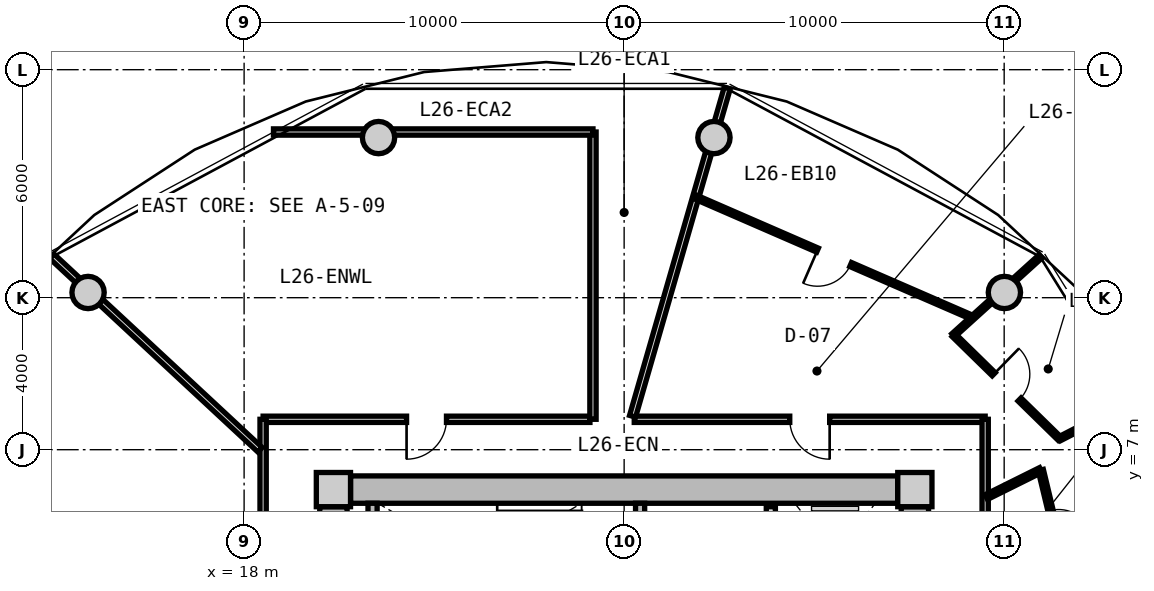
"""IFC4 building model, lengths in metres.
Left out: names, types, materials, properties, quantities, classifications, styles, units other than length and angle.
Written with IfcOpenShell. Run it as: python <this file> out.ifc"""

import sys

from ifc_helpers import new_model, si_unit, direction, frame, frame_2d, origin, origin_2d, place, context, subcontext, project, spatial, rectangle, circle, extrude, source, transform, mapped, element, fill, save


model = new_model("IFC4")
c1 = context("Model", 3, precision=1e-05, world=origin(), true_north=direction((0.0, 1.0)))
c2 = subcontext(c1, "Body", "Model", "MODEL_VIEW")
j1 = project(units=[si_unit("LENGTHUNIT", "METRE"), si_unit("PLANEANGLEUNIT", "RADIAN")], contexts=[c1])
p1 = place(None, origin())
s1 = spatial("IfcSite", under=j1, at=p1, CompositionType="ELEMENT")
p2 = place(p1, origin())
s2 = spatial("IfcBuilding", under=s1, at=p2, CompositionType="ELEMENT")
p3 = place(p2, frame((0.0, 0.0, 87.1)))
s3 = spatial("IfcBuildingStorey", under=s2, at=p3, CompositionType="ELEMENT", Elevation=87.1)
m1 = source(origin(), c2, "Body", "SweptSolid", [
    extrude(rectangle(XDim=0.9, YDim=0.9, at=origin_2d()), origin(), (0.0, 0.0, 1.0), 3.05),
])
for number, where, z_axis, x_axis in (
    (1, (35.65, 5.95, 0.0), (0.0, 0.0, 1.0), (1.0, 0.0, 0.0)),
    (2, (20.35, 5.95, 0.0), (0.0, 0.0, 1.0), (1.0, 0.0, 0.0)),
):
    element("IfcColumn", number, at=place(p3, frame(where, z_axis=z_axis, x_axis=x_axis)), inside=s3, PredefinedType="COLUMN", context=c2, shape_type="MappedRepresentation", body=[
        mapped(m1, transform((0.0, 0.0, 0.0), x_axis=(1.0, 0.0, 0.0), y_axis=(0.0, 1.0, 0.0), z_axis=(0.0, 0.0, 1.0), scale=1.0)),
    ])
m2 = source(origin(), c2, "Body", "SweptSolid", [
    extrude(rectangle(XDim=14.4, YDim=0.72, at=frame_2d((7.2, 0.0))), origin(), (0.0, 0.0, 1.0), 2.79),
])
p4 = place(p3, frame((20.8, 5.95, 0.0), z_axis=(0.0, 0.0, 1.0), x_axis=(1.0, 0.0, 0.0)))
e3 = element("IfcWall", 3, at=p4, inside=s3, PredefinedType="SHEAR", context=c2, shape_type="MappedRepresentation", body=[
    mapped(m2, transform((0.0, 0.0, 0.0), x_axis=(1.0, 0.0, 0.0), y_axis=(0.0, 1.0, 0.0), z_axis=(0.0, 0.0, 1.0), scale=1.0)),
])
m3 = source(origin(), c2, "Body", "SweptSolid", [
    extrude(rectangle(XDim=11.0, YDim=0.72, at=frame_2d((5.5, 0.0))), origin(), (0.0, 0.0, 1.0), 2.79),
])
p5 = place(p3, frame((20.35, -5.5, 0.0), z_axis=(0.0, 0.0, 1.0), x_axis=(0.0, 1.0, 0.0)))
e4 = element("IfcWall", 4, at=p5, inside=s3, PredefinedType="SHEAR", context=c2, shape_type="MappedRepresentation", body=[
    mapped(m3, transform((0.0, 0.0, 0.0), x_axis=(1.0, 0.0, 0.0), y_axis=(0.0, 1.0, 0.0), z_axis=(0.0, 0.0, 1.0), scale=1.0)),
])
p6 = place(p5, frame((3.8, 0.0, 0.0)))
e5 = element("IfcOpeningElement", 5, at=p6, cuts=e4, PredefinedType="OPENING", context=c2, shape_type="SweptSolid", body=[
    extrude(rectangle(XDim=1.2, YDim=2.15, at=frame_2d((0.6, 1.075))), frame((0.0, 0.37, 0.0), z_axis=(0.0, -1.0, 0.0), x_axis=(1.0, 0.0, 0.0)), (0.0, 0.0, 1.0), 0.74),
])
p7 = place(p3, frame((35.65, 5.5, 0.0), z_axis=(0.0, 0.0, 1.0), x_axis=(0.0, -1.0, 0.0)))
e6 = element("IfcWall", 6, at=p7, inside=s3, PredefinedType="SHEAR", context=c2, shape_type="MappedRepresentation", body=[
    mapped(m3, transform((0.0, 0.0, 0.0), x_axis=(1.0, 0.0, 0.0), y_axis=(0.0, 1.0, 0.0), z_axis=(0.0, 0.0, 1.0), scale=1.0)),
])
p8 = place(p7, frame((5.65, 0.0, 0.0)))
e7 = element("IfcOpeningElement", 7, at=p8, cuts=e6, PredefinedType="OPENING", context=c2, shape_type="SweptSolid", body=[
    extrude(rectangle(XDim=1.2, YDim=2.15, at=frame_2d((0.6, 1.075))), frame((0.0, 0.37, 0.0), z_axis=(0.0, -1.0, 0.0), x_axis=(1.0, 0.0, 0.0)), (0.0, 0.0, 1.0), 0.74),
])
m4 = source(origin(), c2, "Body", "SweptSolid", [
    extrude(circle(Radius=0.425, at=origin_2d()), origin(), (0.0, 0.0, 1.0), 3.05),
])
for number, where, z_axis, x_axis in (
    (8, (38.006, 11.137, 0.0), (0.0, 0.0, 1.0), (1.0, 0.0, 0.0)),
    (9, (30.363, 15.213, 0.0), (0.0, 0.0, 1.0), (1.0, 0.0, 0.0)),
    (10, (21.537, 15.213, 0.0), (0.0, 0.0, 1.0), (1.0, 0.0, 0.0)),
    (11, (13.894, 11.137, 0.0), (0.0, 0.0, 1.0), (1.0, 0.0, 0.0)),
):
    element("IfcColumn", number, at=place(p3, frame(where, z_axis=z_axis, x_axis=x_axis)), inside=s3, PredefinedType="COLUMN", context=c2, shape_type="MappedRepresentation", body=[
        mapped(m4, transform((0.0, 0.0, 0.0), x_axis=(1.0, 0.0, 0.0), y_axis=(0.0, 1.0, 0.0), z_axis=(0.0, 0.0, 1.0), scale=1.0)),
    ])
m5 = source(origin(), c2, "Body", "SweptSolid", [
    extrude(rectangle(XDim=3.14, YDim=0.24, at=frame_2d((1.57, 0.0))), origin(), (0.0, 0.0, 1.0), 2.79),
])
p9 = place(p3, frame((21.38, 2.45, 0.0), z_axis=(0.0, 0.0, 1.0), x_axis=(0.0, 1.0, 0.0)))
e12 = element("IfcWall", 12, at=p9, inside=s3, PredefinedType="PARTITIONING", context=c2, shape_type="MappedRepresentation", body=[
    mapped(m5, transform((0.0, 0.0, 0.0), x_axis=(1.0, 0.0, 0.0), y_axis=(0.0, 1.0, 0.0), z_axis=(0.0, 0.0, 1.0), scale=1.0)),
])
p10 = place(p3, frame((28.42, 2.45, 0.0), z_axis=(0.0, 0.0, 1.0), x_axis=(0.0, 1.0, 0.0)))
e13 = element("IfcWall", 13, at=p10, inside=s3, PredefinedType="PARTITIONING", context=c2, shape_type="MappedRepresentation", body=[
    mapped(m5, transform((0.0, 0.0, 0.0), x_axis=(1.0, 0.0, 0.0), y_axis=(0.0, 1.0, 0.0), z_axis=(0.0, 0.0, 1.0), scale=1.0)),
])
p11 = place(p10, frame((0.55, 0.0, 0.0)))
e14 = element("IfcOpeningElement", 14, at=p11, cuts=e13, PredefinedType="OPENING", context=c2, shape_type="SweptSolid", body=[
    extrude(rectangle(XDim=1.1, YDim=2.15, at=frame_2d((0.55, 1.075))), frame((0.0, 0.13, 0.0), z_axis=(0.0, -1.0, 0.0), x_axis=(1.0, 0.0, 0.0)), (0.0, 0.0, 1.0), 0.26),
])
m6 = source(origin(), c2, "Body", "SweptSolid", [
    extrude(rectangle(XDim=5.0, YDim=0.24, at=frame_2d((2.5, 0.0))), origin(), (0.0, 0.0, 1.0), 2.775),
])
p12 = place(p3, frame((31.86, 0.5, 0.0), z_axis=(0.0, 0.0, 1.0), x_axis=(0.0, 1.0, 0.0)))
e15 = element("IfcWall", 15, at=p12, inside=s3, PredefinedType="PARTITIONING", context=c2, shape_type="MappedRepresentation", body=[
    mapped(m6, transform((0.0, 0.0, 0.0), x_axis=(1.0, 0.0, 0.0), y_axis=(0.0, 1.0, 0.0), z_axis=(0.0, 0.0, 1.0), scale=1.0)),
])
p13 = place(p12, frame((3.05, 0.0, 0.0)))
e16 = element("IfcOpeningElement", 16, at=p13, cuts=e15, PredefinedType="OPENING", context=c2, shape_type="SweptSolid", body=[
    extrude(rectangle(XDim=1.3, YDim=2.2, at=frame_2d((0.65, 1.1))), frame((0.0, 0.13, 0.0), z_axis=(0.0, -1.0, 0.0), x_axis=(1.0, 0.0, 0.0)), (0.0, 0.0, 1.0), 0.26),
])
p14 = place(p12, frame((0.55, 0.0, 0.0)))
e17 = element("IfcOpeningElement", 17, at=p14, cuts=e15, PredefinedType="OPENING", context=c2, shape_type="SweptSolid", body=[
    extrude(rectangle(XDim=1.3, YDim=2.2, at=frame_2d((0.65, 1.1))), frame((0.0, 0.13, 0.0), z_axis=(0.0, -1.0, 0.0), x_axis=(1.0, 0.0, 0.0)), (0.0, 0.0, 1.0), 0.26),
])
m7 = source(origin(), c2, "Body", "SweptSolid", [
    extrude(rectangle(XDim=8.6, YDim=0.165, at=frame_2d((4.3, 0.0))), origin(), (0.0, 0.0, 1.0), 2.775),
])
p15 = place(p3, frame((18.5, 7.8, 0.0), z_axis=(0.0, 0.0, 1.0), x_axis=(1.0, 0.0, 0.0)))
e18 = element("IfcWall", 18, at=p15, inside=s3, PredefinedType="PARTITIONING", context=c2, shape_type="MappedRepresentation", body=[
    mapped(m7, transform((0.0, 0.0, 0.0), x_axis=(1.0, 0.0, 0.0), y_axis=(0.0, 1.0, 0.0), z_axis=(0.0, 0.0, 1.0), scale=1.0)),
])
p16 = place(p15, frame((3.775, 0.0, 0.0)))
e19 = element("IfcOpeningElement", 19, at=p16, cuts=e18, PredefinedType="OPENING", context=c2, shape_type="SweptSolid", body=[
    extrude(rectangle(XDim=1.05, YDim=2.15, at=frame_2d((0.525, 1.075))), frame((0.0, 0.093, 0.0), z_axis=(0.0, -1.0, 0.0), x_axis=(1.0, 0.0, 0.0)), (0.0, 0.0, 1.0), 0.185),
])
m8 = source(origin(), c2, "Body", "SweptSolid", [
    extrude(rectangle(XDim=9.234, YDim=0.165, at=frame_2d((4.617, 0.0))), origin(), (0.0, 0.0, 1.0), 2.775),
])
p17 = place(p3, frame((28.266, 7.8, 0.0), z_axis=(0.0, 0.0, 1.0), x_axis=(1.0, 0.0, 0.0)))
e20 = element("IfcWall", 20, at=p17, inside=s3, PredefinedType="PARTITIONING", context=c2, shape_type="MappedRepresentation", body=[
    mapped(m8, transform((0.0, 0.0, 0.0), x_axis=(1.0, 0.0, 0.0), y_axis=(0.0, 1.0, 0.0), z_axis=(0.0, 0.0, 1.0), scale=1.0)),
])
p18 = place(p17, frame((4.092, 0.0, 0.0)))
e21 = element("IfcOpeningElement", 21, at=p18, cuts=e20, PredefinedType="OPENING", context=c2, shape_type="SweptSolid", body=[
    extrude(rectangle(XDim=1.05, YDim=2.15, at=frame_2d((0.525, 1.075))), frame((0.0, 0.093, 0.0), z_axis=(0.0, -1.0, 0.0), x_axis=(1.0, 0.0, 0.0)), (0.0, 0.0, 1.0), 0.185),
])
m9 = source(origin(), c2, "Body", "SweptSolid", [
    extrude(rectangle(XDim=15.6, YDim=0.165, at=frame_2d((7.8, 0.0))), origin(), (0.0, 0.0, 1.0), 2.775),
])
p19 = place(p3, frame((18.5, -7.8, 0.0), z_axis=(0.0, 0.0, 1.0), x_axis=(0.0, 1.0, 0.0)))
e22 = element("IfcWall", 22, at=p19, inside=s3, PredefinedType="PARTITIONING", context=c2, shape_type="MappedRepresentation", body=[
    mapped(m9, transform((0.0, 0.0, 0.0), x_axis=(1.0, 0.0, 0.0), y_axis=(0.0, 1.0, 0.0), z_axis=(0.0, 0.0, 1.0), scale=1.0)),
])
p20 = place(p19, frame((7.134, 0.0, 0.0)))
e23 = element("IfcOpeningElement", 23, at=p20, cuts=e22, PredefinedType="OPENING", context=c2, shape_type="SweptSolid", body=[
    extrude(rectangle(XDim=1.25, YDim=2.2, at=frame_2d((0.625, 1.1))), frame((0.0, 0.093, 0.0), z_axis=(0.0, -1.0, 0.0), x_axis=(1.0, 0.0, 0.0)), (0.0, 0.0, 1.0), 0.185),
])
p21 = place(p3, frame((37.5, 7.8, 0.0), z_axis=(0.0, 0.0, 1.0), x_axis=(0.0, -1.0, 0.0)))
e24 = element("IfcWall", 24, at=p21, inside=s3, PredefinedType="PARTITIONING", context=c2, shape_type="MappedRepresentation", body=[
    mapped(m9, transform((0.0, 0.0, 0.0), x_axis=(1.0, 0.0, 0.0), y_axis=(0.0, 1.0, 0.0), z_axis=(0.0, 0.0, 1.0), scale=1.0)),
])
p22 = place(p21, frame((9.177, 0.0, 0.0)))
e25 = element("IfcOpeningElement", 25, at=p22, cuts=e24, PredefinedType="OPENING", context=c2, shape_type="SweptSolid", body=[
    extrude(rectangle(XDim=1.05, YDim=2.15, at=frame_2d((0.525, 1.075))), frame((0.0, 0.093, 0.0), z_axis=(0.0, -1.0, 0.0), x_axis=(1.0, 0.0, 0.0)), (0.0, 0.0, 1.0), 0.185),
])
m10 = source(origin(), c2, "Body", "SweptSolid", [
    extrude(rectangle(XDim=8.989, YDim=0.165, at=frame_2d((4.495, 0.0))), origin(), (0.0, 0.0, 1.0), 2.275),
])
p23 = place(p3, frame((28.222, 7.88, 0.0), z_axis=(0.0, 0.0, 1.0), x_axis=(0.27702323008, 0.960863221274, 0.0)))
e26 = element("IfcWall", 26, at=p23, inside=s3, PredefinedType="PARTITIONING", context=c2, shape_type="MappedRepresentation", body=[
    mapped(m10, transform((0.0, 0.0, 0.0), x_axis=(1.0, 0.0, 0.0), y_axis=(0.0, 1.0, 0.0), z_axis=(0.0, 0.0, 1.0), scale=1.0)),
])
m11 = source(origin(), c2, "Body", "SweptSolid", [
    extrude(rectangle(XDim=7.482, YDim=0.165, at=frame_2d((3.741, 0.0))), origin(), (0.0, 0.0, 1.0), 2.275),
])
p24 = place(p3, frame((18.42, 6.998, 0.0), z_axis=(0.0, 0.0, 1.0), x_axis=(-0.732508698043, 0.680757671489, 0.0)))
e27 = element("IfcWall", 27, at=p24, inside=s3, PredefinedType="PARTITIONING", context=c2, shape_type="MappedRepresentation", body=[
    mapped(m11, transform((0.0, 0.0, 0.0), x_axis=(1.0, 0.0, 0.0), y_axis=(0.0, 1.0, 0.0), z_axis=(0.0, 0.0, 1.0), scale=1.0)),
])
m12 = source(origin(), c2, "Body", "SweptSolid", [
    extrude(rectangle(XDim=7.56, YDim=0.165, at=frame_2d((3.78, 0.0))), origin(), (0.0, 0.0, 1.0), 2.775),
])
p25 = place(p3, frame((27.18, 7.8, 0.0), z_axis=(0.0, 0.0, 1.0), x_axis=(0.0, 1.0, 0.0)))
e28 = element("IfcWall", 28, at=p25, inside=s3, PredefinedType="PARTITIONING", context=c2, shape_type="MappedRepresentation", body=[
    mapped(m12, transform((0.0, 0.0, 0.0), x_axis=(1.0, 0.0, 0.0), y_axis=(0.0, 1.0, 0.0), z_axis=(0.0, 0.0, 1.0), scale=1.0)),
])
m13 = source(origin(), c2, "Body", "SweptSolid", [
    extrude(rectangle(XDim=8.407, YDim=0.165, at=frame_2d((4.204, 0.0))), origin(), (0.0, 0.0, 1.0), 2.275),
])
p26 = place(p3, frame((18.773, 15.36, 0.0), z_axis=(0.0, 0.0, 1.0), x_axis=(1.0, 0.0, 0.0)))
e29 = element("IfcWall", 29, at=p26, inside=s3, PredefinedType="PARTITIONING", context=c2, shape_type="MappedRepresentation", body=[
    mapped(m13, transform((0.0, 0.0, 0.0), x_axis=(1.0, 0.0, 0.0), y_axis=(0.0, 1.0, 0.0), z_axis=(0.0, 0.0, 1.0), scale=1.0)),
])
m14 = source(origin(), c2, "Body", "SweptSolid", [
    extrude(rectangle(XDim=7.938, YDim=0.115, at=frame_2d((3.969, 0.0))), origin(), (0.0, 0.0, 1.0), 2.775),
])
p27 = place(p3, frame((37.164, 10.479, 0.0), z_axis=(0.0, 0.0, 1.0), x_axis=(-0.917052940979, 0.398765474235, 0.0)))
e30 = element("IfcWall", 30, at=p27, inside=s3, PredefinedType="PARTITIONING", context=c2, shape_type="MappedRepresentation", body=[
    mapped(m14, transform((0.0, 0.0, 0.0), x_axis=(1.0, 0.0, 0.0), y_axis=(0.0, 1.0, 0.0), z_axis=(0.0, 0.0, 1.0), scale=1.0)),
])
p28 = place(p27, frame((3.494, 0.0, 0.0)))
e31 = element("IfcOpeningElement", 31, at=p28, cuts=e30, PredefinedType="OPENING", context=c2, shape_type="SweptSolid", body=[
    extrude(rectangle(XDim=0.95, YDim=2.1, at=frame_2d((0.475, 1.05))), frame((0.0, 0.067, 0.0), z_axis=(0.0, -1.0, 0.0), x_axis=(1.0, 0.0, 0.0)), (0.0, 0.0, 1.0), 0.135),
])
m15 = source(origin(), c2, "Body", "SweptSolid", [
    extrude(rectangle(XDim=3.102, YDim=0.115, at=frame_2d((1.551, 0.0))), origin(), (0.0, 0.0, 1.0), 2.275),
])
p29 = place(p3, frame((36.661, 10.01, 0.0), z_axis=(0.0, 0.0, 1.0), x_axis=(0.741263481794, 0.671214161471, 0.0)))
e32 = element("IfcWall", 32, at=p29, inside=s3, PredefinedType="PARTITIONING", context=c2, shape_type="MappedRepresentation", body=[
    mapped(m15, transform((0.0, 0.0, 0.0), x_axis=(1.0, 0.0, 0.0), y_axis=(0.0, 1.0, 0.0), z_axis=(0.0, 0.0, 1.0), scale=1.0)),
])
m16 = source(origin(), c2, "Body", "SweptSolid", [
    extrude(rectangle(XDim=1.6, YDim=0.14, at=frame_2d((0.8, 0.0))), origin(), (0.0, 0.0, 1.0), 2.775),
])
p30 = place(p3, frame((37.53, 5.754, 0.0), z_axis=(0.0, 0.0, 1.0), x_axis=(0.895522919837, 0.445015393044, 0.0)))
e33 = element("IfcWall", 33, at=p30, inside=s3, PredefinedType="PARTITIONING", context=c2, shape_type="MappedRepresentation", body=[
    mapped(m16, transform((0.0, 0.0, 0.0), x_axis=(1.0, 0.0, 0.0), y_axis=(0.0, 1.0, 0.0), z_axis=(0.0, 0.0, 1.0), scale=1.0)),
])
m17 = source(origin(), c2, "Body", "SweptSolid", [
    extrude(rectangle(XDim=3.112, YDim=0.14, at=frame_2d((1.556, 0.0))), origin(), (0.0, 0.0, 1.0), 2.415),
])
p31 = place(p3, frame((38.963, 6.466, 0.0), z_axis=(0.0, 0.0, 1.0), x_axis=(0.233737944029, -0.972299631555, 0.0)))
e34 = element("IfcWall", 34, at=p31, inside=s3, PredefinedType="PARTITIONING", context=c2, shape_type="MappedRepresentation", body=[
    mapped(m17, transform((0.0, 0.0, 0.0), x_axis=(1.0, 0.0, 0.0), y_axis=(0.0, 1.0, 0.0), z_axis=(0.0, 0.0, 1.0), scale=1.0)),
])
p32 = place(p31, frame((1.096, 0.0, 0.0)))
e35 = element("IfcOpeningElement", 35, at=p32, cuts=e34, PredefinedType="OPENING", context=c2, shape_type="SweptSolid", body=[
    extrude(rectangle(XDim=0.92, YDim=2.1, at=frame_2d((0.46, 1.05))), frame((0.0, 0.08, 0.0), z_axis=(0.0, -1.0, 0.0), x_axis=(1.0, 0.0, 0.0)), (0.0, 0.0, 1.0), 0.16),
])
m18 = source(origin(), c2, "Body", "SweptSolid", [
    extrude(rectangle(XDim=2.117, YDim=0.115, at=frame_2d((1.059, 0.0))), origin(), (0.0, 0.0, 1.0), 2.775),
])
p33 = place(p3, frame((39.46, 7.289, 0.0), z_axis=(0.0, 0.0, 1.0), x_axis=(0.888941834945, 0.45802010227, 0.0)))
e36 = element("IfcWall", 36, at=p33, inside=s3, PredefinedType="PARTITIONING", context=c2, shape_type="MappedRepresentation", body=[
    mapped(m18, transform((0.0, 0.0, 0.0), x_axis=(1.0, 0.0, 0.0), y_axis=(0.0, 1.0, 0.0), z_axis=(0.0, 0.0, 1.0), scale=1.0)),
])
m19 = source(origin(), c2, "Body", "SweptSolid", [
    extrude(rectangle(XDim=3.902, YDim=0.115, at=frame_2d((1.951, 0.0))), origin(), (0.0, 0.0, 1.0), 2.775),
])
p34 = place(p3, frame((39.46, 7.289, 0.0), z_axis=(0.0, 0.0, 1.0), x_axis=(-0.714853061854, 0.699274695637, 0.0)))
e37 = element("IfcWall", 37, at=p34, inside=s3, PredefinedType="PARTITIONING", context=c2, shape_type="MappedRepresentation", body=[
    mapped(m19, transform((0.0, 0.0, 0.0), x_axis=(1.0, 0.0, 0.0), y_axis=(0.0, 1.0, 0.0), z_axis=(0.0, 0.0, 1.0), scale=1.0)),
])
p35 = place(p34, frame((1.476, 0.0, 0.0)))
e38 = element("IfcOpeningElement", 38, at=p35, cuts=e37, PredefinedType="OPENING", context=c2, shape_type="SweptSolid", body=[
    extrude(rectangle(XDim=0.95, YDim=2.1, at=frame_2d((0.475, 1.05))), frame((0.0, 0.067, 0.0), z_axis=(0.0, -1.0, 0.0), x_axis=(1.0, 0.0, 0.0)), (0.0, 0.0, 1.0), 0.135),
])
m20 = source(origin(), c2, "Body", "SweptSolid", [
    extrude(rectangle(XDim=1.05, YDim=2.15, at=frame_2d((0.525, 1.075))), frame((0.0, 0.025, 0.0), z_axis=(0.0, -1.0, 0.0), x_axis=(1.0, 0.0, 0.0)), (0.0, 0.0, 1.0), 0.05),
])
p36 = place(p16, frame((1.05, 0.0, 0.0), z_axis=(0.0, 0.0, 1.0), x_axis=(-1.0, 0.0, 0.0)))
e39 = element("IfcDoor", 39, at=p36, inside=s3, OperationType="SINGLE_SWING_RIGHT", PredefinedType="DOOR", context=c2, shape_type="MappedRepresentation", body=[
    mapped(m20, transform((0.0, 0.0, 0.0), x_axis=(1.0, 0.0, 0.0), y_axis=(0.0, 1.0, 0.0), z_axis=(0.0, 0.0, 1.0), scale=1.0)),
])
fill(e19, e39)
p37 = place(p18, frame((1.05, 0.0, 0.0), z_axis=(0.0, 0.0, 1.0), x_axis=(-1.0, 0.0, 0.0)))
e40 = element("IfcDoor", 40, at=p37, inside=s3, OperationType="SINGLE_SWING_LEFT", PredefinedType="DOOR", context=c2, shape_type="MappedRepresentation", body=[
    mapped(m20, transform((0.0, 0.0, 0.0), x_axis=(1.0, 0.0, 0.0), y_axis=(0.0, 1.0, 0.0), z_axis=(0.0, 0.0, 1.0), scale=1.0)),
])
fill(e21, e40)
m21 = source(origin(), c2, "Body", "SweptSolid", [
    extrude(rectangle(XDim=0.92, YDim=2.1, at=frame_2d((0.46, 1.05))), frame((0.0, 0.025, 0.0), z_axis=(0.0, -1.0, 0.0), x_axis=(1.0, 0.0, 0.0)), (0.0, 0.0, 1.0), 0.05),
])
p38 = place(p32, origin())
e41 = element("IfcDoor", 41, at=p38, inside=s3, OperationType="SINGLE_SWING_RIGHT", PredefinedType="DOOR", context=c2, shape_type="MappedRepresentation", body=[
    mapped(m21, transform((0.0, 0.0, 0.0), x_axis=(1.0, 0.0, 0.0), y_axis=(0.0, 1.0, 0.0), z_axis=(0.0, 0.0, 1.0), scale=1.0)),
])
fill(e35, e41)
m22 = source(origin(), c2, "Body", "SweptSolid", [
    extrude(rectangle(XDim=0.95, YDim=2.1, at=frame_2d((0.475, 1.05))), frame((0.0, 0.025, 0.0), z_axis=(0.0, -1.0, 0.0), x_axis=(1.0, 0.0, 0.0)), (0.0, 0.0, 1.0), 0.05),
])
p39 = place(p35, frame((0.95, 0.0, 0.0), z_axis=(0.0, 0.0, 1.0), x_axis=(-1.0, 0.0, 0.0)))
e42 = element("IfcDoor", 42, at=p39, inside=s3, OperationType="SINGLE_SWING_LEFT", PredefinedType="DOOR", context=c2, shape_type="MappedRepresentation", body=[
    mapped(m22, transform((0.0, 0.0, 0.0), x_axis=(1.0, 0.0, 0.0), y_axis=(0.0, 1.0, 0.0), z_axis=(0.0, 0.0, 1.0), scale=1.0)),
])
fill(e38, e42)
p40 = place(p28, origin())
e43 = element("IfcDoor", 43, at=p40, inside=s3, OperationType="SINGLE_SWING_RIGHT", PredefinedType="DOOR", context=c2, shape_type="MappedRepresentation", body=[
    mapped(m22, transform((0.0, 0.0, 0.0), x_axis=(1.0, 0.0, 0.0), y_axis=(0.0, 1.0, 0.0), z_axis=(0.0, 0.0, 1.0), scale=1.0)),
])
fill(e31, e43)
save(model, sys.argv[1])
